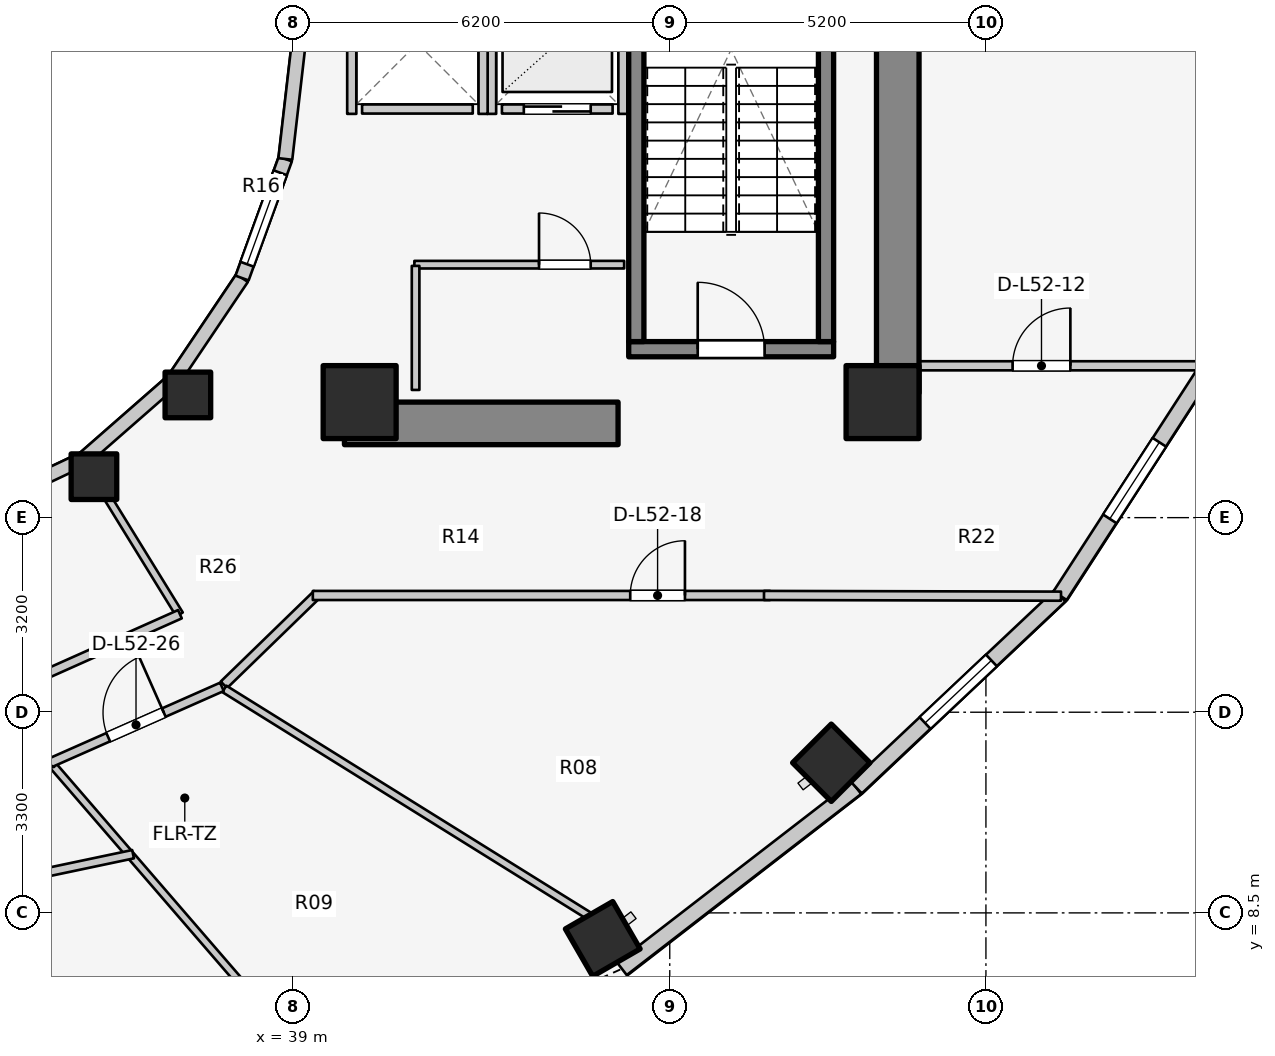
"""IFC4 building model, lengths in metres.
Left out: names, types, materials, properties, quantities, classifications, styles, units other than length and angle.
Written with IfcOpenShell. Run it as: python <this file> out.ifc"""

import sys

from ifc_helpers import new_model, si_unit, direction, frame, frame_2d, origin, origin_2d, place, context, subcontext, project, spatial, rectangle, extrude, element, fill, save


model = new_model("IFC4")
c1 = context("Model", 3, precision=1e-05, world=origin(), true_north=direction((0.0, 1.0)))
c2 = subcontext(c1, "Body", "Model", "MODEL_VIEW")
j1 = project(units=[si_unit("LENGTHUNIT", "METRE"), si_unit("PLANEANGLEUNIT", "RADIAN")], contexts=[c1])
p1 = place(None, origin())
s1 = spatial("IfcSite", under=j1, at=p1, CompositionType="ELEMENT")
p2 = place(p1, origin())
s2 = spatial("IfcBuilding", under=s1, at=p2, CompositionType="ELEMENT")
p3 = place(p2, frame((0.0, 0.0, 171.5)))
s3 = spatial("IfcBuildingStorey", under=s2, at=p3, CompositionType="ELEMENT", Elevation=171.5)
p4 = place(p3, frame((48.95, 17.05, 0.0), z_axis=(0.0, 0.0, 1.0), x_axis=(0.0, 1.0, 0.0)))
e1 = element("IfcWall", 1, at=p4, inside=s3, PredefinedType="SHEAR", context=c2, shape_type="SweptSolid", body=[
    extrude(rectangle(XDim=12.8, YDim=0.7, at=frame_2d((6.4, 0.0))), origin(), (0.0, 0.0, 1.0), 3.1),
])
p5 = place(p3, frame((39.85, 16.55, 0.0), z_axis=(0.0, 0.0, 1.0), x_axis=(1.0, 0.0, 0.0)))
e2 = element("IfcWall", 2, at=p5, inside=s3, PredefinedType="SHEAR", context=c2, shape_type="SweptSolid", body=[
    extrude(rectangle(XDim=4.5, YDim=0.7, at=frame_2d((2.25, 0.0))), origin(), (0.0, 0.0, 1.0), 3.1),
])
p6 = place(p3, frame((44.525, 17.77, 0.0), z_axis=(0.0, 0.0, 1.0), x_axis=(1.0, 0.0, 0.0)))
e3 = element("IfcWall", 3, at=p6, inside=s3, PredefinedType="SOLIDWALL", context=c2, shape_type="SweptSolid", body=[
    extrude(rectangle(XDim=3.37, YDim=0.25, at=frame_2d((1.685, 0.0))), origin(), (0.0, 0.0, 1.0), 3.1),
])
p7 = place(p6, frame((1.135, 0.0, 0.0)))
e4 = element("IfcOpeningElement", 4, at=p7, cuts=e3, PredefinedType="OPENING", context=c2, shape_type="SweptSolid", body=[
    extrude(rectangle(XDim=1.1, YDim=2.1, at=frame_2d((0.55, 1.05))), frame((0.0, 0.135, 0.0), z_axis=(0.0, -1.0, 0.0), x_axis=(1.0, 0.0, 0.0)), (0.0, 0.0, 1.0), 0.27),
])
for number, where, z_axis, x_axis in (
    (5, (44.65, 17.895, 0.0), (0.0, 0.0, 1.0), (0.0, 1.0, 0.0)),
    (6, (47.77, 17.895, 0.0), (0.0, 0.0, 1.0), (0.0, 1.0, 0.0)),
):
    element("IfcWall", number, at=place(p3, frame(where, z_axis=z_axis, x_axis=x_axis)), inside=s3, PredefinedType="SOLIDWALL", context=c2, shape_type="SweptSolid", body=[
        extrude(rectangle(XDim=7.81, YDim=0.25, at=frame_2d((3.905, 0.0))), origin(), (0.0, 0.0, 1.0), 3.1),
    ])
for number, where, z_axis, x_axis in (
    (7, (40.1, 16.9, 0.0), (0.0, 0.0, 1.0), (1.0, 0.0, 0.0)),
    (8, (48.7, 16.9, 0.0), (0.0, 0.0, 1.0), (1.0, 0.0, 0.0)),
):
    element("IfcColumn", number, at=place(p3, frame(where, z_axis=z_axis, x_axis=x_axis)), inside=s3, PredefinedType="COLUMN", context=c2, shape_type="SweptSolid", body=[
        extrude(rectangle(XDim=1.2, YDim=1.2, at=origin_2d()), origin(), (0.0, 0.0, 1.0), 3.1),
    ])
p8 = place(p3, frame((35.73, 15.673, 0.0), z_axis=(0.0, 0.0, 1.0), x_axis=(1.0, 0.0, 0.0)))
e9 = element("IfcColumn", 9, at=p8, inside=s3, PredefinedType="COLUMN", context=c2, shape_type="SweptSolid", body=[
    extrude(rectangle(XDim=0.75, YDim=0.75, at=origin_2d()), origin(), (0.0, 0.0, 1.0), 3.1),
])
p9 = place(p3, frame((44.098, 8.072, 0.0), z_axis=(0.0, 0.0, 1.0), x_axis=(0.5, -0.866025403784, 0.0)))
e10 = element("IfcColumn", 10, at=p9, inside=s3, PredefinedType="COLUMN", context=c2, shape_type="SweptSolid", body=[
    extrude(rectangle(XDim=0.9, YDim=0.9, at=origin_2d()), origin(), (0.0, 0.0, 1.0), 3.1),
])
p10 = place(p3, frame((37.275, 17.018, 0.0), z_axis=(0.0, 0.0, 1.0), x_axis=(1.0, 0.0, 0.0)))
e11 = element("IfcColumn", 11, at=p10, inside=s3, PredefinedType="COLUMN", context=c2, shape_type="SweptSolid", body=[
    extrude(rectangle(XDim=0.75, YDim=0.75, at=origin_2d()), origin(), (0.0, 0.0, 1.0), 3.1),
])
p11 = place(p3, frame((47.857, 10.969, 0.0), z_axis=(0.0, 0.0, 1.0), x_axis=(0.707106781187, -0.707106781187, 0.0)))
e12 = element("IfcColumn", 12, at=p11, inside=s3, PredefinedType="COLUMN", context=c2, shape_type="SweptSolid", body=[
    extrude(rectangle(XDim=0.9, YDim=0.9, at=origin_2d()), origin(), (0.0, 0.0, 1.0), 3.1),
])
p12 = place(p3, frame((33.843, 15.157, 0.0), z_axis=(0.0, 0.0, 1.0), x_axis=(0.904179699603, 0.427152280606, 0.0)))
e13 = element("IfcWall", 13, at=p12, inside=s3, PredefinedType="STANDARD", context=c2, shape_type="SweptSolid", body=[
    extrude(rectangle(XDim=1.899, YDim=0.23, at=frame_2d((0.95, 0.0))), origin(), (0.0, 0.0, 1.0), 2.16),
])
p13 = place(p3, frame((35.56, 15.968, 0.0), z_axis=(0.0, 0.0, 1.0), x_axis=(0.752576694707, 0.658504607869, 0.0)))
e14 = element("IfcWall", 14, at=p13, inside=s3, PredefinedType="STANDARD", context=c2, shape_type="SweptSolid", body=[
    extrude(rectangle(XDim=1.959, YDim=0.23, at=frame_2d((0.98, 0.0))), origin(), (0.0, 0.0, 1.0), 2.16),
])
p14 = place(p3, frame((37.035, 17.258, 0.0), z_axis=(0.0, 0.0, 1.0), x_axis=(0.558197800898, 0.829707909492, 0.0)))
e15 = element("IfcWall", 15, at=p14, inside=s3, PredefinedType="STANDARD", context=c2, shape_type="SweptSolid", body=[
    extrude(rectangle(XDim=2.027, YDim=0.23, at=frame_2d((1.013, 0.0))), origin(), (0.0, 0.0, 1.0), 2.16),
])
p15 = place(p3, frame((38.166, 18.94, 0.0), z_axis=(0.0, 0.0, 1.0), x_axis=(0.341423187295, 0.93990968033, 0.0)))
e16 = element("IfcWall", 16, at=p15, inside=s3, PredefinedType="STANDARD", context=c2, shape_type="SweptSolid", body=[
    extrude(rectangle(XDim=2.084, YDim=0.23, at=frame_2d((1.042, 0.0))), origin(), (0.0, 0.0, 1.0), 2.84),
])
p16 = place(p15, frame((0.242, 0.0, 0.85)))
e17 = element("IfcOpeningElement", 17, at=p16, cuts=e16, PredefinedType="OPENING", context=c2, shape_type="SweptSolid", body=[
    extrude(rectangle(XDim=1.6, YDim=1.65, at=frame_2d((0.8, 0.825))), frame((0.0, 0.125, 0.0), z_axis=(0.0, -1.0, 0.0), x_axis=(1.0, 0.0, 0.0)), (0.0, 0.0, 1.0), 0.25),
])
p17 = place(p3, frame((38.877, 20.898, 0.0), z_axis=(0.0, 0.0, 1.0), x_axis=(0.114711713601, 0.993398823617, 0.0)))
e18 = element("IfcWall", 18, at=p17, inside=s3, PredefinedType="STANDARD", context=c2, shape_type="SweptSolid", body=[
    extrude(rectangle(XDim=2.115, YDim=0.23, at=frame_2d((1.058, 0.0))), origin(), (0.0, 0.0, 1.0), 2.84),
])
p18 = place(p3, frame((44.413, 7.581, 0.0), z_axis=(0.0, 0.0, 1.0), x_axis=(0.791460185804, 0.611220724687, 0.0)))
e19 = element("IfcWall", 19, at=p18, inside=s3, PredefinedType="STANDARD", context=c2, shape_type="SweptSolid", body=[
    extrude(rectangle(XDim=4.872, YDim=0.26, at=frame_2d((2.436, 0.0))), origin(), (0.0, 0.0, 1.0), 2.85),
])
p19 = place(p3, frame((48.269, 10.559, 0.0), z_axis=(0.0, 0.0, 1.0), x_axis=(0.727667301037, 0.68593024354, 0.0)))
e20 = element("IfcWall", 20, at=p19, inside=s3, PredefinedType="STANDARD", context=c2, shape_type="SweptSolid", body=[
    extrude(rectangle(XDim=4.604, YDim=0.26, at=frame_2d((2.302, 0.0))), origin(), (0.0, 0.0, 1.0), 2.85),
])
p20 = place(p19, frame((1.552, 0.0, 0.75)))
e21 = element("IfcOpeningElement", 21, at=p20, cuts=e20, PredefinedType="OPENING", context=c2, shape_type="SweptSolid", body=[
    extrude(rectangle(XDim=1.5, YDim=1.6, at=frame_2d((0.75, 0.8))), frame((0.0, 0.14, 0.0), z_axis=(0.0, -1.0, 0.0), x_axis=(1.0, 0.0, 0.0)), (0.0, 0.0, 1.0), 0.28),
])
p21 = place(p3, frame((51.619, 13.716, 0.0), z_axis=(0.0, 0.0, 1.0), x_axis=(0.543358984534, 0.839500454989, 0.0)))
e22 = element("IfcWall", 22, at=p21, inside=s3, PredefinedType="STANDARD", context=c2, shape_type="SweptSolid", body=[
    extrude(rectangle(XDim=4.511, YDim=0.26, at=frame_2d((2.256, 0.0))), origin(), (0.0, 0.0, 1.0), 2.85),
])
p22 = place(p21, frame((1.506, 0.0, 0.75)))
e23 = element("IfcOpeningElement", 23, at=p22, cuts=e22, PredefinedType="OPENING", context=c2, shape_type="SweptSolid", body=[
    extrude(rectangle(XDim=1.5, YDim=1.6, at=frame_2d((0.75, 0.8))), frame((0.0, 0.14, 0.0), z_axis=(0.0, -1.0, 0.0), x_axis=(1.0, 0.0, 0.0)), (0.0, 0.0, 1.0), 0.28),
])
p23 = place(p3, frame((42.44, 21.72, 0.0), z_axis=(0.0, 0.0, 1.0), x_axis=(1.0, 0.0, 0.0)))
e24 = element("IfcWall", 24, at=p23, inside=s3, PredefinedType="SOLIDWALL", context=c2, shape_type="SweptSolid", body=[
    extrude(rectangle(XDim=1.82, YDim=0.15, at=frame_2d((0.91, 0.0))), origin(), (0.0, 0.0, 1.0), 2.855),
])
p24 = place(p23, frame((0.36, 0.0, 0.0)))
e25 = element("IfcOpeningElement", 25, at=p24, cuts=e24, PredefinedType="OPENING", context=c2, shape_type="SweptSolid", body=[
    extrude(rectangle(XDim=1.1, YDim=2.1, at=frame_2d((0.55, 1.05))), frame((0.0, 0.085, 0.0), z_axis=(0.0, -1.0, 0.0), x_axis=(1.0, 0.0, 0.0)), (0.0, 0.0, 1.0), 0.17),
])
for number, where, z_axis, x_axis in (
    (26, (42.27, 21.64, 0.0), (0.0, 0.0, 1.0), (0.0, 1.0, 0.0)),
    (27, (44.43, 21.64, 0.0), (0.0, 0.0, 1.0), (0.0, 1.0, 0.0)),
):
    element("IfcWall", number, at=place(p3, frame(where, z_axis=z_axis, x_axis=x_axis)), inside=s3, PredefinedType="SOLIDWALL", context=c2, shape_type="SweptSolid", body=[
        extrude(rectangle(XDim=2.32, YDim=0.15, at=frame_2d((1.16, 0.0))), origin(), (0.0, 0.0, 1.0), 2.855),
    ])
p25 = place(p3, frame((40.14, 21.72, 0.0), z_axis=(0.0, 0.0, 1.0), x_axis=(1.0, 0.0, 0.0)))
e28 = element("IfcWall", 28, at=p25, inside=s3, PredefinedType="SOLIDWALL", context=c2, shape_type="SweptSolid", body=[
    extrude(rectangle(XDim=1.82, YDim=0.15, at=frame_2d((0.91, 0.0))), origin(), (0.0, 0.0, 1.0), 2.12),
])
p26 = place(p3, frame((39.97, 21.64, 0.0), z_axis=(0.0, 0.0, 1.0), x_axis=(0.0, 1.0, 0.0)))
e29 = element("IfcWall", 29, at=p26, inside=s3, PredefinedType="SOLIDWALL", context=c2, shape_type="SweptSolid", body=[
    extrude(rectangle(XDim=2.32, YDim=0.15, at=frame_2d((1.16, 0.0))), origin(), (0.0, 0.0, 1.0), 2.12),
])
p27 = place(p3, frame((42.13, 21.64, 0.0), z_axis=(0.0, 0.0, 1.0), x_axis=(0.0, 1.0, 0.0)))
e30 = element("IfcWall", 30, at=p27, inside=s3, PredefinedType="SOLIDWALL", context=c2, shape_type="SweptSolid", body=[
    extrude(rectangle(XDim=2.32, YDim=0.15, at=frame_2d((1.16, 0.0))), origin(), (0.0, 0.0, 1.0), 2.855),
])
p28 = place(p3, frame((41.0, 19.16, 0.0), z_axis=(0.0, 0.0, 1.0), x_axis=(1.0, 0.0, 0.0)))
e31 = element("IfcWall", 31, at=p28, inside=s3, PredefinedType="PARTITIONING", context=c2, shape_type="SweptSolid", body=[
    extrude(rectangle(XDim=3.45, YDim=0.125, at=frame_2d((1.725, 0.0))), origin(), (0.0, 0.0, 1.0), 2.12),
])
p29 = place(p28, frame((2.05, 0.0, 0.0)))
e32 = element("IfcOpeningElement", 32, at=p29, cuts=e31, PredefinedType="OPENING", context=c2, shape_type="SweptSolid", body=[
    extrude(rectangle(XDim=0.85, YDim=2.05, at=frame_2d((0.425, 1.025))), frame((0.0, 0.073, 0.0), z_axis=(0.0, -1.0, 0.0), x_axis=(1.0, 0.0, 0.0)), (0.0, 0.0, 1.0), 0.145),
])
p30 = place(p3, frame((41.02, 17.1, 0.0), z_axis=(0.0, 0.0, 1.0), x_axis=(0.0, 1.0, 0.0)))
e33 = element("IfcWall", 33, at=p30, inside=s3, PredefinedType="PARTITIONING", context=c2, shape_type="SweptSolid", body=[
    extrude(rectangle(XDim=2.04, YDim=0.125, at=frame_2d((1.02, 0.0))), origin(), (0.0, 0.0, 1.0), 2.855),
])
p31 = place(p3, frame((48.95, 17.497, 0.0), z_axis=(0.0, 0.0, 1.0), x_axis=(1.0, 0.0, 0.0)))
e34 = element("IfcWall", 34, at=p31, inside=s3, PredefinedType="PARTITIONING", context=c2, shape_type="SweptSolid", body=[
    extrude(rectangle(XDim=5.14, YDim=0.15, at=frame_2d((2.57, 0.0))), origin(), (0.0, 0.0, 1.0), 2.855),
])
p32 = place(p31, frame((1.889, 0.0, 0.0)))
e35 = element("IfcOpeningElement", 35, at=p32, cuts=e34, PredefinedType="OPENING", context=c2, shape_type="SweptSolid", body=[
    extrude(rectangle(XDim=0.95, YDim=2.1, at=frame_2d((0.475, 1.05))), frame((0.0, 0.085, 0.0), z_axis=(0.0, -1.0, 0.0), x_axis=(1.0, 0.0, 0.0)), (0.0, 0.0, 1.0), 0.17),
])
p33 = place(p3, frame((37.867, 12.251, 0.0), z_axis=(0.0, 0.0, 1.0), x_axis=(0.717419568599, 0.696641344302, 0.0)))
e36 = element("IfcWall", 36, at=p33, inside=s3, PredefinedType="PARTITIONING", context=c2, shape_type="SweptSolid", body=[
    extrude(rectangle(XDim=2.138, YDim=0.15, at=frame_2d((1.069, 0.0))), origin(), (0.0, 0.0, 1.0), 2.299),
])
p34 = place(p3, frame((39.33, 13.72, 0.0), z_axis=(0.0, 0.0, 1.0), x_axis=(1.0, 0.0, 0.0)))
e37 = element("IfcWall", 37, at=p34, inside=s3, PredefinedType="PARTITIONING", context=c2, shape_type="SweptSolid", body=[
    extrude(rectangle(XDim=7.52, YDim=0.15, at=frame_2d((3.76, 0.0))), origin(), (0.0, 0.0, 1.0), 2.299),
])
p35 = place(p34, frame((5.22, 0.0, 0.0)))
e38 = element("IfcOpeningElement", 38, at=p35, cuts=e37, PredefinedType="OPENING", context=c2, shape_type="SweptSolid", body=[
    extrude(rectangle(XDim=0.9, YDim=2.1, at=frame_2d((0.45, 1.05))), frame((0.0, 0.085, 0.0), z_axis=(0.0, -1.0, 0.0), x_axis=(1.0, 0.0, 0.0)), (0.0, 0.0, 1.0), 0.17),
])
p36 = place(p3, frame((46.75, 13.72, 0.0), z_axis=(0.0, 0.0, 1.0), x_axis=(0.999997122315, -0.00239903348, 0.0)))
e39 = element("IfcWall", 39, at=p36, inside=s3, PredefinedType="PARTITIONING", context=c2, shape_type="SweptSolid", body=[
    extrude(rectangle(XDim=4.885, YDim=0.15, at=frame_2d((2.442, 0.0))), origin(), (0.0, 0.0, 1.0), 2.22),
])
p37 = place(p3, frame((35.55, 15.985, 0.0), z_axis=(0.0, 0.0, 1.0), x_axis=(0.524565340045, -0.851370192116, 0.0)))
e40 = element("IfcWall", 40, at=p37, inside=s3, PredefinedType="PARTITIONING", context=c2, shape_type="SweptSolid", body=[
    extrude(rectangle(XDim=3.027, YDim=0.125, at=frame_2d((1.514, 0.0))), origin(), (0.0, 0.0, 1.0), 2.299),
])
p38 = place(p3, frame((34.658, 12.301, 0.0), z_axis=(0.0, 0.0, 1.0), x_axis=(0.912985265053, 0.407992531545, 0.0)))
e41 = element("IfcWall", 41, at=p38, inside=s3, PredefinedType="PARTITIONING", context=c2, shape_type="SweptSolid", body=[
    extrude(rectangle(XDim=2.723, YDim=0.15, at=frame_2d((1.362, 0.0))), origin(), (0.0, 0.0, 1.0), 2.299),
])
p39 = place(p3, frame((35.053, 10.927, 0.0), z_axis=(0.0, 0.0, 1.0), x_axis=(0.653779283332, -0.756685303601, 0.0)))
e42 = element("IfcWall", 42, at=p39, inside=s3, PredefinedType="PARTITIONING", context=c2, shape_type="SweptSolid", body=[
    extrude(rectangle(XDim=6.14, YDim=0.125, at=frame_2d((3.07, 0.0))), origin(), (0.0, 0.0, 1.0), 2.299),
])
p40 = place(p3, frame((37.875, 12.184, 0.0), z_axis=(0.0, 0.0, 1.0), x_axis=(0.849008457073, -0.528379257559, 0.0)))
e43 = element("IfcWall", 43, at=p40, inside=s3, PredefinedType="PARTITIONING", context=c2, shape_type="SweptSolid", body=[
    extrude(rectangle(XDim=7.077, YDim=0.125, at=frame_2d((3.539, 0.0))), origin(), (0.0, 0.0, 1.0), 2.299),
])
p41 = place(p3, frame((31.95, 10.537, 0.0), z_axis=(0.0, 0.0, 1.0), x_axis=(0.990254405439, 0.139270285808, 0.0)))
e44 = element("IfcWall", 44, at=p41, inside=s3, PredefinedType="PARTITIONING", context=c2, shape_type="SweptSolid", body=[
    extrude(rectangle(XDim=3.147, YDim=0.15, at=frame_2d((1.573, 0.0))), origin(), (0.0, 0.0, 1.0), 2.299),
])
p42 = place(p3, frame((31.951, 8.534, 0.0), z_axis=(0.0, 0.0, 1.0), x_axis=(0.97851996891, 0.206152056609, 0.0)))
e45 = element("IfcWall", 45, at=p42, inside=s3, PredefinedType="PLUMBINGWALL", context=c2, shape_type="SweptSolid", body=[
    extrude(rectangle(XDim=4.519, YDim=0.14, at=frame_2d((2.26, 0.0))), origin(), (0.0, 0.0, 1.0), 2.299),
])
p43 = place(p42, frame((1.81, 0.0, 0.0)))
e46 = element("IfcOpeningElement", 46, at=p43, cuts=e45, PredefinedType="OPENING", context=c2, shape_type="SweptSolid", body=[
    extrude(rectangle(XDim=0.9, YDim=2.1, at=frame_2d((0.45, 1.05))), frame((0.0, 0.08, 0.0), z_axis=(0.0, -1.0, 0.0), x_axis=(1.0, 0.0, 0.0)), (0.0, 0.0, 1.0), 0.16),
])
p44 = place(p3, frame((35.009, 10.966, 0.0), z_axis=(0.0, 0.0, 1.0), x_axis=(0.91445214467, 0.404694051239, 0.0)))
e47 = element("IfcWall", 47, at=p44, inside=s3, PredefinedType="PARTITIONING", context=c2, shape_type="SweptSolid", body=[
    extrude(rectangle(XDim=3.091, YDim=0.15, at=frame_2d((1.545, 0.0))), origin(), (0.0, 0.0, 1.0), 2.299),
])
p45 = place(p44, frame((1.045, 0.0, 0.0)))
e48 = element("IfcOpeningElement", 48, at=p45, cuts=e47, PredefinedType="OPENING", context=c2, shape_type="SweptSolid", body=[
    extrude(rectangle(XDim=1.0, YDim=2.1, at=frame_2d((0.5, 1.05))), frame((0.0, 0.085, 0.0), z_axis=(0.0, -1.0, 0.0), x_axis=(1.0, 0.0, 0.0)), (0.0, 0.0, 1.0), 0.17),
])
p46 = place(p16, origin())
e49 = element("IfcWindow", 49, at=p46, inside=s3, PartitioningType="SINGLE_PANEL", PredefinedType="WINDOW", context=c2, shape_type="SweptSolid", body=[
    extrude(rectangle(XDim=1.6, YDim=1.65, at=frame_2d((0.8, 0.825))), frame((0.0, 0.03, 0.0), z_axis=(0.0, -1.0, 0.0), x_axis=(1.0, 0.0, 0.0)), (0.0, 0.0, 1.0), 0.06),
])
fill(e17, e49)
p47 = place(p20, origin())
e50 = element("IfcWindow", 50, at=p47, inside=s3, PartitioningType="SINGLE_PANEL", PredefinedType="WINDOW", context=c2, shape_type="SweptSolid", body=[
    extrude(rectangle(XDim=1.5, YDim=1.6, at=frame_2d((0.75, 0.8))), frame((0.0, 0.03, 0.0), z_axis=(0.0, -1.0, 0.0), x_axis=(1.0, 0.0, 0.0)), (0.0, 0.0, 1.0), 0.06),
])
fill(e21, e50)
p48 = place(p22, origin())
e51 = element("IfcWindow", 51, at=p48, inside=s3, PartitioningType="SINGLE_PANEL", PredefinedType="WINDOW", context=c2, shape_type="SweptSolid", body=[
    extrude(rectangle(XDim=1.5, YDim=1.6, at=frame_2d((0.75, 0.8))), frame((0.0, 0.03, 0.0), z_axis=(0.0, -1.0, 0.0), x_axis=(1.0, 0.0, 0.0)), (0.0, 0.0, 1.0), 0.06),
])
fill(e23, e51)
p49 = place(p7, origin())
e52 = element("IfcDoor", 52, at=p49, inside=s3, OperationType="SINGLE_SWING_LEFT", PredefinedType="DOOR", context=c2, shape_type="SweptSolid", body=[
    extrude(rectangle(XDim=1.1, YDim=2.1, at=frame_2d((0.55, 1.05))), frame((0.0, 0.025, 0.0), z_axis=(0.0, -1.0, 0.0), x_axis=(1.0, 0.0, 0.0)), (0.0, 0.0, 1.0), 0.05),
])
fill(e4, e52)
p50 = place(p24, origin())
e53 = element("IfcDoor", 53, at=p50, inside=s3, OperationType="DOUBLE_DOOR_SLIDING", PredefinedType="DOOR", context=c2, shape_type="SweptSolid", body=[
    extrude(rectangle(XDim=1.1, YDim=2.1, at=frame_2d((0.55, 1.05))), frame((0.0, 0.025, 0.0), z_axis=(0.0, -1.0, 0.0), x_axis=(1.0, 0.0, 0.0)), (0.0, 0.0, 1.0), 0.05),
])
fill(e25, e53)
p51 = place(p29, origin())
e54 = element("IfcDoor", 54, at=p51, inside=s3, OperationType="SINGLE_SWING_LEFT", PredefinedType="DOOR", context=c2, shape_type="SweptSolid", body=[
    extrude(rectangle(XDim=0.85, YDim=2.05, at=frame_2d((0.425, 1.025))), frame((0.0, 0.025, 0.0), z_axis=(0.0, -1.0, 0.0), x_axis=(1.0, 0.0, 0.0)), (0.0, 0.0, 1.0), 0.05),
])
fill(e32, e54)
p52 = place(p32, origin())
e55 = element("IfcDoor", 55, at=p52, inside=s3, OperationType="SINGLE_SWING_RIGHT", PredefinedType="DOOR", context=c2, shape_type="SweptSolid", body=[
    extrude(rectangle(XDim=0.95, YDim=2.1, at=frame_2d((0.475, 1.05))), frame((0.0, 0.025, 0.0), z_axis=(0.0, -1.0, 0.0), x_axis=(1.0, 0.0, 0.0)), (0.0, 0.0, 1.0), 0.05),
])
fill(e35, e55)
p53 = place(p35, origin())
e56 = element("IfcDoor", 56, at=p53, inside=s3, OperationType="SINGLE_SWING_RIGHT", PredefinedType="DOOR", context=c2, shape_type="SweptSolid", body=[
    extrude(rectangle(XDim=0.9, YDim=2.1, at=frame_2d((0.45, 1.05))), frame((0.0, 0.025, 0.0), z_axis=(0.0, -1.0, 0.0), x_axis=(1.0, 0.0, 0.0)), (0.0, 0.0, 1.0), 0.05),
])
fill(e38, e56)
p54 = place(p45, origin())
e57 = element("IfcDoor", 57, at=p54, inside=s3, OperationType="SINGLE_SWING_RIGHT", PredefinedType="DOOR", context=c2, shape_type="SweptSolid", body=[
    extrude(rectangle(XDim=1.0, YDim=2.1, at=frame_2d((0.5, 1.05))), frame((0.0, 0.025, 0.0), z_axis=(0.0, -1.0, 0.0), x_axis=(1.0, 0.0, 0.0)), (0.0, 0.0, 1.0), 0.05),
])
fill(e48, e57)
save(model, sys.argv[1])
